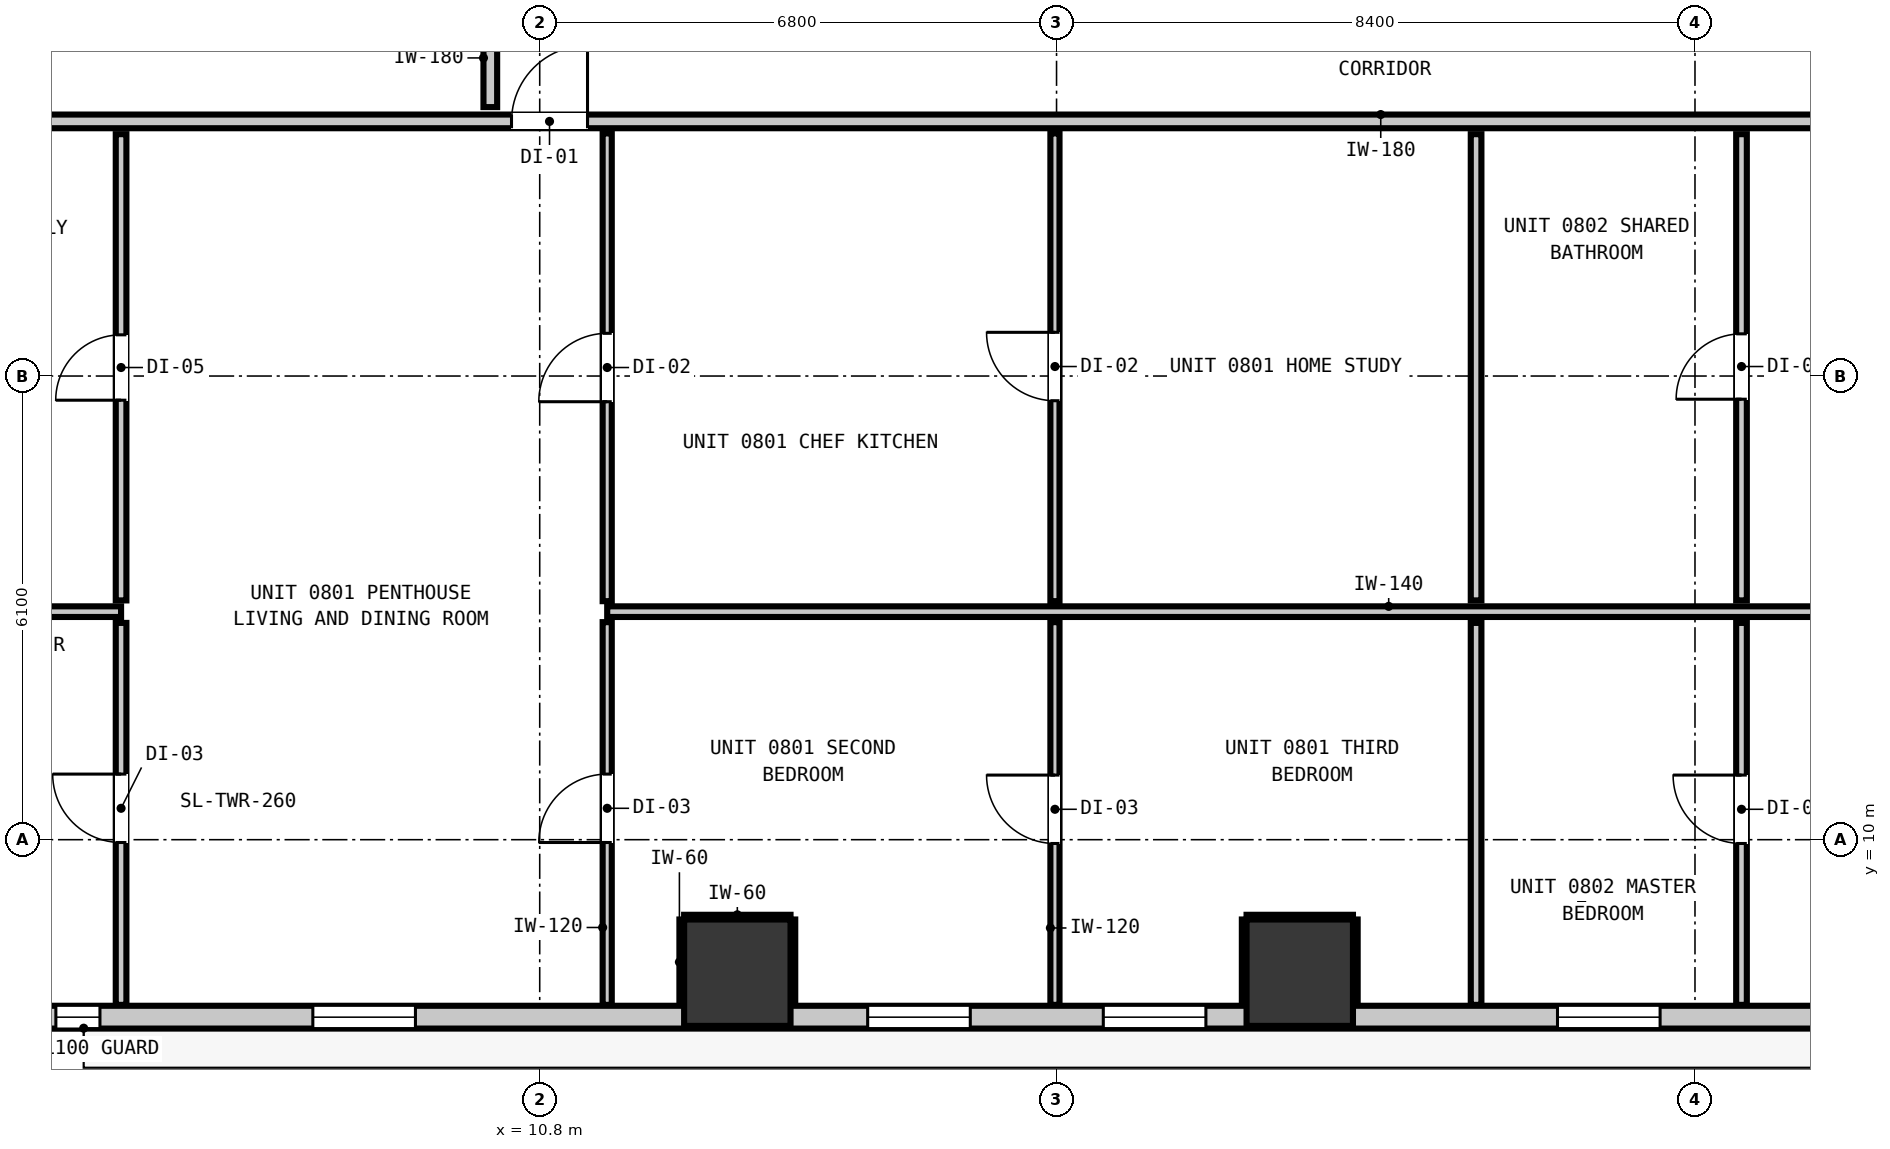
"""IFC4 building model, lengths in metres.
Left out: names, types, materials, properties, quantities, classifications, styles, units other than length and angle.
Written with IfcOpenShell. Run it as: python <this file> out.ifc"""

import sys

from ifc_helpers import new_model, si_unit, direction, frame, frame_2d, origin, origin_2d, place, context, subcontext, project, spatial, rectangle, extrude, element, fill, save


model = new_model("IFC4")
c1 = context("Model", 3, precision=1e-05, world=origin(), true_north=direction((0.0, 1.0)))
c2 = subcontext(c1, "Body", "Model", "MODEL_VIEW")
j1 = project(units=[si_unit("LENGTHUNIT", "METRE"), si_unit("PLANEANGLEUNIT", "RADIAN")], contexts=[c1])
p1 = place(None, origin())
s1 = spatial("IfcSite", under=j1, at=p1, CompositionType="ELEMENT")
p2 = place(p1, origin())
s2 = spatial("IfcBuilding", under=s1, at=p2, CompositionType="ELEMENT")
p3 = place(p2, frame((0.0, 0.0, 31.96)))
s3 = spatial("IfcBuildingStorey", under=s2, at=p3, CompositionType="ELEMENT", Elevation=31.96)
for number, where, z_axis, x_axis in (
    (1, (13.4, 8.25, 0.0), (0.0, 0.0, 1.0), (1.0, 0.0, 0.0)),
    (2, (20.8, 8.25, 0.0), (0.0, 0.0, 1.0), (1.0, 0.0, 0.0)),
):
    element("IfcColumn", number, at=place(p3, frame(where, z_axis=z_axis, x_axis=x_axis)), inside=s3, PredefinedType="COLUMN", context=c2, shape_type="SweptSolid", body=[
        extrude(rectangle(XDim=1.4, YDim=1.4, at=origin_2d()), origin(), (0.0, 0.0, 1.0), 3.32),
    ])
p4 = place(p3, frame((41.635, 7.665, 0.0), z_axis=(0.0, 0.0, 1.0), x_axis=(-1.0, 0.0, 0.0)))
e3 = element("IfcWall", 3, at=p4, inside=s3, PredefinedType="STANDARD", context=c2, shape_type="SweptSolid", body=[
    extrude(rectangle(XDim=37.47, YDim=0.3, at=frame_2d((18.735, 0.0))), origin(), (0.0, 0.0, 1.0), 3.06),
])
p5 = place(p4, frame((0.901, 0.0, 0.0)))
e4 = element("IfcOpeningElement", 4, at=p5, cuts=e3, PredefinedType="OPENING", context=c2, shape_type="SweptSolid", body=[
    extrude(rectangle(XDim=1.0, YDim=2.15, at=frame_2d((0.5, 1.075))), frame((0.0, 0.16, 0.0), z_axis=(0.0, -1.0, 0.0), x_axis=(1.0, 0.0, 0.0)), (0.0, 0.0, 1.0), 0.32),
])
p6 = place(p4, frame((32.47, 0.0, 0.85)))
e5 = element("IfcOpeningElement", 5, at=p6, cuts=e3, PredefinedType="OPENING", context=c2, shape_type="SweptSolid", body=[
    extrude(rectangle(XDim=1.35, YDim=1.85, at=frame_2d((0.675, 0.925))), frame((0.0, 0.16, 0.0), z_axis=(0.0, -1.0, 0.0), x_axis=(1.0, 0.0, 0.0)), (0.0, 0.0, 1.0), 0.32),
])
p7 = place(p4, frame((36.621, 0.0, 0.85)))
e6 = element("IfcOpeningElement", 6, at=p7, cuts=e3, PredefinedType="OPENING", context=c2, shape_type="SweptSolid", body=[
    extrude(rectangle(XDim=0.58, YDim=1.5, at=frame_2d((0.29, 0.75))), frame((0.0, 0.16, 0.0), z_axis=(0.0, -1.0, 0.0), x_axis=(1.0, 0.0, 0.0)), (0.0, 0.0, 1.0), 0.32),
])
p8 = place(p4, frame((25.17, 0.0, 0.85)))
e7 = element("IfcOpeningElement", 7, at=p8, cuts=e3, PredefinedType="OPENING", context=c2, shape_type="SweptSolid", body=[
    extrude(rectangle(XDim=1.35, YDim=1.85, at=frame_2d((0.675, 0.925))), frame((0.0, 0.16, 0.0), z_axis=(0.0, -1.0, 0.0), x_axis=(1.0, 0.0, 0.0)), (0.0, 0.0, 1.0), 0.32),
])
p9 = place(p4, frame((22.07, 0.0, 0.85)))
e8 = element("IfcOpeningElement", 8, at=p9, cuts=e3, PredefinedType="OPENING", context=c2, shape_type="SweptSolid", body=[
    extrude(rectangle(XDim=1.35, YDim=1.85, at=frame_2d((0.675, 0.925))), frame((0.0, 0.16, 0.0), z_axis=(0.0, -1.0, 0.0), x_axis=(1.0, 0.0, 0.0)), (0.0, 0.0, 1.0), 0.32),
])
p10 = place(p4, frame((8.11, 0.0, 0.85)))
e9 = element("IfcOpeningElement", 9, at=p10, cuts=e3, PredefinedType="OPENING", context=c2, shape_type="SweptSolid", body=[
    extrude(rectangle(XDim=1.35, YDim=1.85, at=frame_2d((0.675, 0.925))), frame((0.0, 0.16, 0.0), z_axis=(0.0, -1.0, 0.0), x_axis=(1.0, 0.0, 0.0)), (0.0, 0.0, 1.0), 0.32),
])
p11 = place(p4, frame((16.094, 0.0, 0.85)))
e10 = element("IfcOpeningElement", 10, at=p11, cuts=e3, PredefinedType="OPENING", context=c2, shape_type="SweptSolid", body=[
    extrude(rectangle(XDim=1.35, YDim=1.85, at=frame_2d((0.675, 0.925))), frame((0.0, 0.16, 0.0), z_axis=(0.0, -1.0, 0.0), x_axis=(1.0, 0.0, 0.0)), (0.0, 0.0, 1.0), 0.32),
])
p12 = place(p3, frame((1.827, 19.45, 0.0), z_axis=(0.0, 0.0, 1.0), x_axis=(1.0, 0.0, 0.0)))
e11 = element("IfcWall", 11, at=p12, inside=s3, PredefinedType="PARTITIONING", context=c2, shape_type="SweptSolid", body=[
    extrude(rectangle(XDim=42.146, YDim=0.18, at=frame_2d((21.073, 0.0))), origin(), (0.0, 0.0, 1.0), 3.06),
])
p13 = place(p12, frame((8.602, 0.0, 0.0)))
e12 = element("IfcOpeningElement", 12, at=p13, cuts=e11, PredefinedType="OPENING", context=c2, shape_type="SweptSolid", body=[
    extrude(rectangle(XDim=1.0, YDim=2.15, at=frame_2d((0.5, 1.075))), frame((0.0, 0.1, 0.0), z_axis=(0.0, -1.0, 0.0), x_axis=(1.0, 0.0, 0.0)), (0.0, 0.0, 1.0), 0.2),
])
p14 = place(p12, frame((30.475, 0.0, 0.0)))
e13 = element("IfcOpeningElement", 13, at=p14, cuts=e11, PredefinedType="OPENING", context=c2, shape_type="SweptSolid", body=[
    extrude(rectangle(XDim=1.0, YDim=2.15, at=frame_2d((0.5, 1.075))), frame((0.0, 0.1, 0.0), z_axis=(0.0, -1.0, 0.0), x_axis=(1.0, 0.0, 0.0)), (0.0, 0.0, 1.0), 0.2),
])
p15 = place(p3, frame((1.827, 13.0, 0.0), z_axis=(0.0, 0.0, 1.0), x_axis=(1.0, 0.0, 0.0)))
e14 = element("IfcWall", 14, at=p15, inside=s3, PredefinedType="PARTITIONING", context=c2, shape_type="SweptSolid", body=[
    extrude(rectangle(XDim=3.465, YDim=0.14, at=frame_2d((1.732, 0.0))), origin(), (0.0, 0.0, 1.0), 3.06),
])
p16 = place(p3, frame((11.688, 13.0, 0.0), z_axis=(0.0, 0.0, 1.0), x_axis=(1.0, 0.0, 0.0)))
e15 = element("IfcWall", 15, at=p16, inside=s3, PredefinedType="PARTITIONING", context=c2, shape_type="SweptSolid", body=[
    extrude(rectangle(XDim=32.285, YDim=0.14, at=frame_2d((16.143, 0.0))), origin(), (0.0, 0.0, 1.0), 3.06),
])
p17 = place(p16, frame((20.664, 0.0, 0.0)))
e16 = element("IfcOpeningElement", 16, at=p17, cuts=e15, PredefinedType="OPENING", context=c2, shape_type="SweptSolid", body=[
    extrude(rectangle(XDim=0.9, YDim=2.1, at=frame_2d((0.45, 1.05))), frame((0.0, 0.08, 0.0), z_axis=(0.0, -1.0, 0.0), x_axis=(1.0, 0.0, 0.0)), (0.0, 0.0, 1.0), 0.16),
])
p18 = place(p3, frame((10.15, 19.638, 0.0), z_axis=(0.0, 0.0, 1.0), x_axis=(0.0, 1.0, 0.0)))
e17 = element("IfcWall", 17, at=p18, inside=s3, PredefinedType="PARTITIONING", context=c2, shape_type="SweptSolid", body=[
    extrude(rectangle(XDim=1.294, YDim=0.18, at=frame_2d((0.647, 0.0))), origin(), (0.0, 0.0, 1.0), 3.06),
])
p19 = place(p3, frame((5.292, 7.827, 0.0), z_axis=(0.0, 0.0, 1.0), x_axis=(0.0, 1.0, 0.0)))
e18 = element("IfcWall", 18, at=p19, inside=s3, PredefinedType="PARTITIONING", context=c2, shape_type="SweptSolid", body=[
    extrude(rectangle(XDim=5.025, YDim=0.14, at=frame_2d((2.513, 0.0))), origin(), (0.0, 0.0, 1.0), 3.06),
])
p20 = place(p19, frame((2.136, 0.0, 0.0)))
e19 = element("IfcOpeningElement", 19, at=p20, cuts=e18, PredefinedType="OPENING", context=c2, shape_type="SweptSolid", body=[
    extrude(rectangle(XDim=0.9, YDim=2.1, at=frame_2d((0.45, 1.05))), frame((0.0, 0.08, 0.0), z_axis=(0.0, -1.0, 0.0), x_axis=(1.0, 0.0, 0.0)), (0.0, 0.0, 1.0), 0.16),
])
p21 = place(p3, frame((5.292, 13.148, 0.0), z_axis=(0.0, 0.0, 1.0), x_axis=(0.0, 1.0, 0.0)))
e20 = element("IfcWall", 20, at=p21, inside=s3, PredefinedType="PARTITIONING", context=c2, shape_type="SweptSolid", body=[
    extrude(rectangle(XDim=6.134, YDim=0.14, at=frame_2d((3.067, 0.0))), origin(), (0.0, 0.0, 1.0), 3.06),
])
p22 = place(p21, frame((2.634, 0.0, 0.0)))
e21 = element("IfcOpeningElement", 21, at=p22, cuts=e20, PredefinedType="OPENING", context=c2, shape_type="SweptSolid", body=[
    extrude(rectangle(XDim=0.86, YDim=2.02, at=frame_2d((0.43, 1.01))), frame((0.0, 0.08, 0.0), z_axis=(0.0, -1.0, 0.0), x_axis=(1.0, 0.0, 0.0)), (0.0, 0.0, 1.0), 0.16),
])
p23 = place(p3, frame((23.12, 7.827, 0.0), z_axis=(0.0, 0.0, 1.0), x_axis=(0.0, 1.0, 0.0)))
e22 = element("IfcWall", 22, at=p23, inside=s3, PredefinedType="PARTITIONING", context=c2, shape_type="SweptSolid", body=[
    extrude(rectangle(XDim=5.025, YDim=0.14, at=frame_2d((2.513, 0.0))), origin(), (0.0, 0.0, 1.0), 3.06),
])
p24 = place(p3, frame((23.12, 13.148, 0.0), z_axis=(0.0, 0.0, 1.0), x_axis=(0.0, 1.0, 0.0)))
e23 = element("IfcWall", 23, at=p24, inside=s3, PredefinedType="PARTITIONING", context=c2, shape_type="SweptSolid", body=[
    extrude(rectangle(XDim=6.134, YDim=0.14, at=frame_2d((3.067, 0.0))), origin(), (0.0, 0.0, 1.0), 3.06),
])
p25 = place(p3, frame((26.612, 7.827, 0.0), z_axis=(0.0, 0.0, 1.0), x_axis=(0.0, 1.0, 0.0)))
e24 = element("IfcWall", 24, at=p25, inside=s3, PredefinedType="PARTITIONING", context=c2, shape_type="SweptSolid", body=[
    extrude(rectangle(XDim=5.025, YDim=0.14, at=frame_2d((2.513, 0.0))), origin(), (0.0, 0.0, 1.0), 3.06),
])
p26 = place(p25, frame((2.123, 0.0, 0.0)))
e25 = element("IfcOpeningElement", 25, at=p26, cuts=e24, PredefinedType="OPENING", context=c2, shape_type="SweptSolid", body=[
    extrude(rectangle(XDim=0.9, YDim=2.1, at=frame_2d((0.45, 1.05))), frame((0.0, 0.08, 0.0), z_axis=(0.0, -1.0, 0.0), x_axis=(1.0, 0.0, 0.0)), (0.0, 0.0, 1.0), 0.16),
])
p27 = place(p3, frame((26.612, 13.148, 0.0), z_axis=(0.0, 0.0, 1.0), x_axis=(0.0, 1.0, 0.0)))
e26 = element("IfcWall", 26, at=p27, inside=s3, PredefinedType="PARTITIONING", context=c2, shape_type="SweptSolid", body=[
    extrude(rectangle(XDim=6.134, YDim=0.14, at=frame_2d((3.067, 0.0))), origin(), (0.0, 0.0, 1.0), 3.06),
])
p28 = place(p27, frame((2.647, 0.0, 0.0)))
e27 = element("IfcOpeningElement", 27, at=p28, cuts=e26, PredefinedType="OPENING", context=c2, shape_type="SweptSolid", body=[
    extrude(rectangle(XDim=0.86, YDim=2.02, at=frame_2d((0.43, 1.01))), frame((0.0, 0.08, 0.0), z_axis=(0.0, -1.0, 0.0), x_axis=(1.0, 0.0, 0.0)), (0.0, 0.0, 1.0), 0.16),
])
p29 = place(p3, frame((11.688, 7.827, 0.0), z_axis=(0.0, 0.0, 1.0), x_axis=(0.0, 1.0, 0.0)))
e28 = element("IfcWall", 28, at=p29, inside=s3, PredefinedType="PARTITIONING", context=c2, shape_type="SweptSolid", body=[
    extrude(rectangle(XDim=5.035, YDim=0.12, at=frame_2d((2.518, 0.0))), origin(), (0.0, 0.0, 1.0), 3.06),
])
p30 = place(p29, frame((2.136, 0.0, 0.0)))
e29 = element("IfcOpeningElement", 29, at=p30, cuts=e28, PredefinedType="OPENING", context=c2, shape_type="SweptSolid", body=[
    extrude(rectangle(XDim=0.9, YDim=2.1, at=frame_2d((0.45, 1.05))), frame((0.0, 0.07, 0.0), z_axis=(0.0, -1.0, 0.0), x_axis=(1.0, 0.0, 0.0)), (0.0, 0.0, 1.0), 0.14),
])
p31 = place(p3, frame((11.688, 13.138, 0.0), z_axis=(0.0, 0.0, 1.0), x_axis=(0.0, 1.0, 0.0)))
e30 = element("IfcWall", 30, at=p31, inside=s3, PredefinedType="PARTITIONING", context=c2, shape_type="SweptSolid", body=[
    extrude(rectangle(XDim=6.154, YDim=0.12, at=frame_2d((3.077, 0.0))), origin(), (0.0, 0.0, 1.0), 3.06),
])
p32 = place(p31, frame((2.624, 0.0, 0.0)))
e31 = element("IfcOpeningElement", 31, at=p32, cuts=e30, PredefinedType="OPENING", context=c2, shape_type="SweptSolid", body=[
    extrude(rectangle(XDim=0.9, YDim=2.1, at=frame_2d((0.45, 1.05))), frame((0.0, 0.07, 0.0), z_axis=(0.0, -1.0, 0.0), x_axis=(1.0, 0.0, 0.0)), (0.0, 0.0, 1.0), 0.14),
])
p33 = place(p3, frame((17.579, 7.827, 0.0), z_axis=(0.0, 0.0, 1.0), x_axis=(0.0, 1.0, 0.0)))
e32 = element("IfcWall", 32, at=p33, inside=s3, PredefinedType="PARTITIONING", context=c2, shape_type="SweptSolid", body=[
    extrude(rectangle(XDim=5.035, YDim=0.12, at=frame_2d((2.518, 0.0))), origin(), (0.0, 0.0, 1.0), 3.06),
])
p34 = place(p33, frame((2.123, 0.0, 0.0)))
e33 = element("IfcOpeningElement", 33, at=p34, cuts=e32, PredefinedType="OPENING", context=c2, shape_type="SweptSolid", body=[
    extrude(rectangle(XDim=0.9, YDim=2.1, at=frame_2d((0.45, 1.05))), frame((0.0, 0.07, 0.0), z_axis=(0.0, -1.0, 0.0), x_axis=(1.0, 0.0, 0.0)), (0.0, 0.0, 1.0), 0.14),
])
p35 = place(p3, frame((17.579, 13.138, 0.0), z_axis=(0.0, 0.0, 1.0), x_axis=(0.0, 1.0, 0.0)))
e34 = element("IfcWall", 34, at=p35, inside=s3, PredefinedType="PARTITIONING", context=c2, shape_type="SweptSolid", body=[
    extrude(rectangle(XDim=6.154, YDim=0.12, at=frame_2d((3.077, 0.0))), origin(), (0.0, 0.0, 1.0), 3.06),
])
p36 = place(p35, frame((2.637, 0.0, 0.0)))
e35 = element("IfcOpeningElement", 35, at=p36, cuts=e34, PredefinedType="OPENING", context=c2, shape_type="SweptSolid", body=[
    extrude(rectangle(XDim=0.9, YDim=2.1, at=frame_2d((0.45, 1.05))), frame((0.0, 0.07, 0.0), z_axis=(0.0, -1.0, 0.0), x_axis=(1.0, 0.0, 0.0)), (0.0, 0.0, 1.0), 0.14),
])
p37 = place(p3, frame((12.7, 8.982, 0.0), z_axis=(0.0, 0.0, 1.0), x_axis=(1.0, 0.0, 0.0)))
e36 = element("IfcWall", 36, at=p37, inside=s3, PredefinedType="PARTITIONING", context=c2, shape_type="SweptSolid", body=[
    extrude(rectangle(XDim=1.4, YDim=0.06, at=frame_2d((0.7, 0.0))), origin(), (0.0, 0.0, 1.0), 1.45),
])
for number, where, z_axis, x_axis in (
    (37, (12.668, 7.83, 0.0), (0.0, 0.0, 1.0), (0.0, 1.0, 0.0)),
    (38, (14.132, 7.83, 0.0), (0.0, 0.0, 1.0), (0.0, 1.0, 0.0)),
):
    element("IfcWall", number, at=place(p3, frame(where, z_axis=z_axis, x_axis=x_axis)), inside=s3, PredefinedType="PARTITIONING", context=c2, shape_type="SweptSolid", body=[
        extrude(rectangle(XDim=1.12, YDim=0.06, at=frame_2d((0.56, 0.0))), origin(), (0.0, 0.0, 1.0), 1.45),
    ])
p38 = place(p3, frame((20.1, 8.982, 0.0), z_axis=(0.0, 0.0, 1.0), x_axis=(1.0, 0.0, 0.0)))
e39 = element("IfcWall", 39, at=p38, inside=s3, PredefinedType="PARTITIONING", context=c2, shape_type="SweptSolid", body=[
    extrude(rectangle(XDim=1.4, YDim=0.06, at=frame_2d((0.7, 0.0))), origin(), (0.0, 0.0, 1.0), 1.45),
])
for number, where, z_axis, x_axis in (
    (40, (20.068, 7.83, 0.0), (0.0, 0.0, 1.0), (0.0, 1.0, 0.0)),
    (41, (21.532, 7.83, 0.0), (0.0, 0.0, 1.0), (0.0, 1.0, 0.0)),
):
    element("IfcWall", number, at=place(p3, frame(where, z_axis=z_axis, x_axis=x_axis)), inside=s3, PredefinedType="PARTITIONING", context=c2, shape_type="SweptSolid", body=[
        extrude(rectangle(XDim=1.12, YDim=0.06, at=frame_2d((0.56, 0.0))), origin(), (0.0, 0.0, 1.0), 1.45),
    ])
p39 = place(p6, origin())
e42 = element("IfcWindow", 42, at=p39, inside=s3, PartitioningType="SINGLE_PANEL", PredefinedType="WINDOW", context=c2, shape_type="SweptSolid", body=[
    extrude(rectangle(XDim=1.35, YDim=1.85, at=frame_2d((0.675, 0.925))), frame((0.0, 0.03, 0.0), z_axis=(0.0, -1.0, 0.0), x_axis=(1.0, 0.0, 0.0)), (0.0, 0.0, 1.0), 0.06),
])
fill(e5, e42)
p40 = place(p7, origin())
e43 = element("IfcWindow", 43, at=p40, inside=s3, PartitioningType="SINGLE_PANEL", PredefinedType="WINDOW", context=c2, shape_type="SweptSolid", body=[
    extrude(rectangle(XDim=0.58, YDim=1.5, at=frame_2d((0.29, 0.75))), frame((0.0, 0.03, 0.0), z_axis=(0.0, -1.0, 0.0), x_axis=(1.0, 0.0, 0.0)), (0.0, 0.0, 1.0), 0.06),
])
fill(e6, e43)
p41 = place(p8, origin())
e44 = element("IfcWindow", 44, at=p41, inside=s3, PartitioningType="SINGLE_PANEL", PredefinedType="WINDOW", context=c2, shape_type="SweptSolid", body=[
    extrude(rectangle(XDim=1.35, YDim=1.85, at=frame_2d((0.675, 0.925))), frame((0.0, 0.03, 0.0), z_axis=(0.0, -1.0, 0.0), x_axis=(1.0, 0.0, 0.0)), (0.0, 0.0, 1.0), 0.06),
])
fill(e7, e44)
p42 = place(p9, origin())
e45 = element("IfcWindow", 45, at=p42, inside=s3, PartitioningType="SINGLE_PANEL", PredefinedType="WINDOW", context=c2, shape_type="SweptSolid", body=[
    extrude(rectangle(XDim=1.35, YDim=1.85, at=frame_2d((0.675, 0.925))), frame((0.0, 0.03, 0.0), z_axis=(0.0, -1.0, 0.0), x_axis=(1.0, 0.0, 0.0)), (0.0, 0.0, 1.0), 0.06),
])
fill(e8, e45)
p43 = place(p11, origin())
e46 = element("IfcWindow", 46, at=p43, inside=s3, PartitioningType="SINGLE_PANEL", PredefinedType="WINDOW", context=c2, shape_type="SweptSolid", body=[
    extrude(rectangle(XDim=1.35, YDim=1.85, at=frame_2d((0.675, 0.925))), frame((0.0, 0.03, 0.0), z_axis=(0.0, -1.0, 0.0), x_axis=(1.0, 0.0, 0.0)), (0.0, 0.0, 1.0), 0.06),
])
fill(e10, e46)
p44 = place(p13, origin())
e47 = element("IfcDoor", 47, at=p44, inside=s3, OperationType="SINGLE_SWING_RIGHT", PredefinedType="DOOR", context=c2, shape_type="SweptSolid", body=[
    extrude(rectangle(XDim=1.0, YDim=2.15, at=frame_2d((0.5, 1.075))), frame((0.0, 0.025, 0.0), z_axis=(0.0, -1.0, 0.0), x_axis=(1.0, 0.0, 0.0)), (0.0, 0.0, 1.0), 0.05),
])
fill(e12, e47)
p45 = place(p22, origin())
e48 = element("IfcDoor", 48, at=p45, inside=s3, OperationType="SINGLE_SWING_LEFT", PredefinedType="DOOR", context=c2, shape_type="SweptSolid", body=[
    extrude(rectangle(XDim=0.86, YDim=2.02, at=frame_2d((0.43, 1.01))), frame((0.0, 0.025, 0.0), z_axis=(0.0, -1.0, 0.0), x_axis=(1.0, 0.0, 0.0)), (0.0, 0.0, 1.0), 0.05),
])
fill(e21, e48)
p46 = place(p20, origin())
e49 = element("IfcDoor", 49, at=p46, inside=s3, OperationType="SINGLE_SWING_RIGHT", PredefinedType="DOOR", context=c2, shape_type="SweptSolid", body=[
    extrude(rectangle(XDim=0.9, YDim=2.1, at=frame_2d((0.45, 1.05))), frame((0.0, 0.025, 0.0), z_axis=(0.0, -1.0, 0.0), x_axis=(1.0, 0.0, 0.0)), (0.0, 0.0, 1.0), 0.05),
])
fill(e19, e49)
p47 = place(p32, origin())
e50 = element("IfcDoor", 50, at=p47, inside=s3, OperationType="SINGLE_SWING_LEFT", PredefinedType="DOOR", context=c2, shape_type="SweptSolid", body=[
    extrude(rectangle(XDim=0.9, YDim=2.1, at=frame_2d((0.45, 1.05))), frame((0.0, 0.025, 0.0), z_axis=(0.0, -1.0, 0.0), x_axis=(1.0, 0.0, 0.0)), (0.0, 0.0, 1.0), 0.05),
])
fill(e31, e50)
p48 = place(p36, origin())
e51 = element("IfcDoor", 51, at=p48, inside=s3, OperationType="SINGLE_SWING_RIGHT", PredefinedType="DOOR", context=c2, shape_type="SweptSolid", body=[
    extrude(rectangle(XDim=0.9, YDim=2.1, at=frame_2d((0.45, 1.05))), frame((0.0, 0.025, 0.0), z_axis=(0.0, -1.0, 0.0), x_axis=(1.0, 0.0, 0.0)), (0.0, 0.0, 1.0), 0.05),
])
fill(e35, e51)
p49 = place(p30, origin())
e52 = element("IfcDoor", 52, at=p49, inside=s3, OperationType="SINGLE_SWING_LEFT", PredefinedType="DOOR", context=c2, shape_type="SweptSolid", body=[
    extrude(rectangle(XDim=0.9, YDim=2.1, at=frame_2d((0.45, 1.05))), frame((0.0, 0.025, 0.0), z_axis=(0.0, -1.0, 0.0), x_axis=(1.0, 0.0, 0.0)), (0.0, 0.0, 1.0), 0.05),
])
fill(e29, e52)
p50 = place(p34, origin())
e53 = element("IfcDoor", 53, at=p50, inside=s3, OperationType="SINGLE_SWING_RIGHT", PredefinedType="DOOR", context=c2, shape_type="SweptSolid", body=[
    extrude(rectangle(XDim=0.9, YDim=2.1, at=frame_2d((0.45, 1.05))), frame((0.0, 0.025, 0.0), z_axis=(0.0, -1.0, 0.0), x_axis=(1.0, 0.0, 0.0)), (0.0, 0.0, 1.0), 0.05),
])
fill(e33, e53)
p51 = place(p28, origin())
e54 = element("IfcDoor", 54, at=p51, inside=s3, OperationType="SINGLE_SWING_LEFT", PredefinedType="DOOR", context=c2, shape_type="SweptSolid", body=[
    extrude(rectangle(XDim=0.86, YDim=2.02, at=frame_2d((0.43, 1.01))), frame((0.0, 0.025, 0.0), z_axis=(0.0, -1.0, 0.0), x_axis=(1.0, 0.0, 0.0)), (0.0, 0.0, 1.0), 0.05),
])
fill(e27, e54)
p52 = place(p26, origin())
e55 = element("IfcDoor", 55, at=p52, inside=s3, OperationType="SINGLE_SWING_RIGHT", PredefinedType="DOOR", context=c2, shape_type="SweptSolid", body=[
    extrude(rectangle(XDim=0.9, YDim=2.1, at=frame_2d((0.45, 1.05))), frame((0.0, 0.025, 0.0), z_axis=(0.0, -1.0, 0.0), x_axis=(1.0, 0.0, 0.0)), (0.0, 0.0, 1.0), 0.05),
])
fill(e25, e55)
save(model, sys.argv[1])
